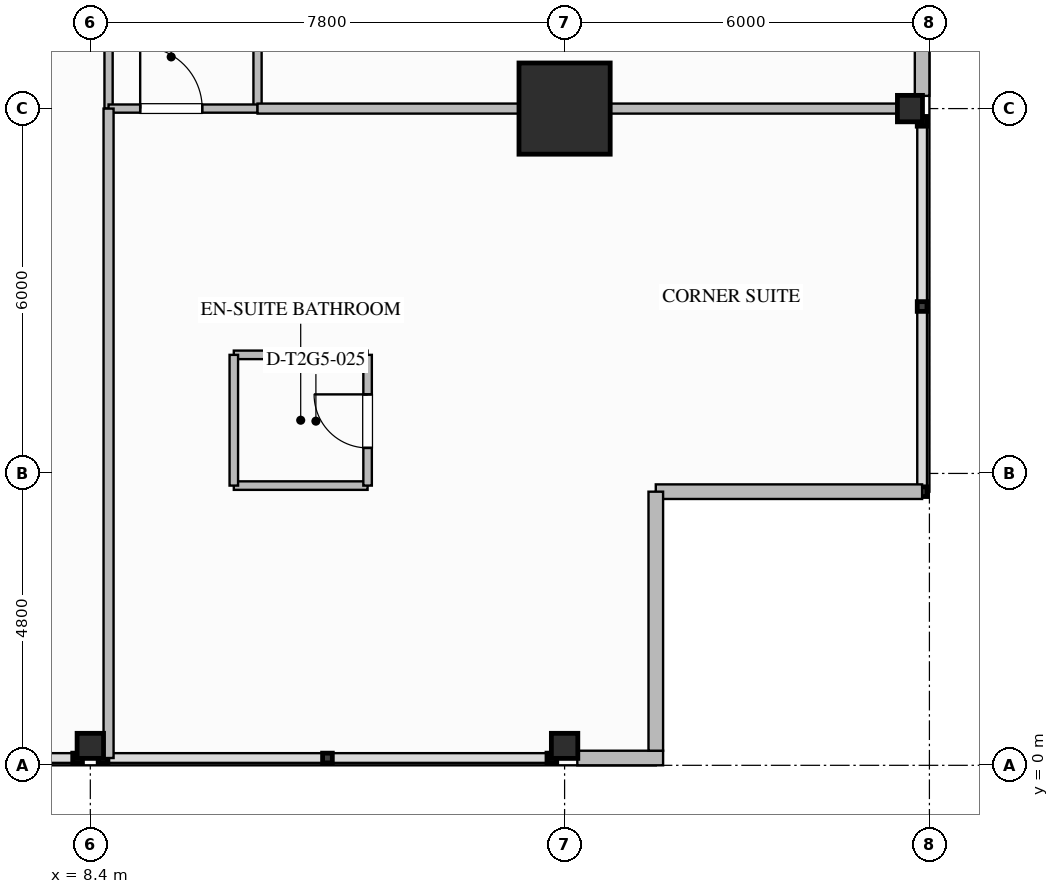
"""IFC4 building model, lengths in metres.
Left out: names, types, materials, properties, quantities, classifications, styles, units other than length and angle.
Written with IfcOpenShell. Run it as: python <this file> out.ifc"""

import sys

from ifc_helpers import new_model, si_unit, direction, frame, frame_2d, origin, origin_2d, place, context, subcontext, project, spatial, rectangle, i_section, extrude, element, fill, save


model = new_model("IFC4")
c1 = context("Model", 3, precision=1e-05, world=origin(), true_north=direction((0.0, 1.0)))
c2 = subcontext(c1, "Body", "Model", "MODEL_VIEW")
j1 = project(units=[si_unit("LENGTHUNIT", "METRE"), si_unit("PLANEANGLEUNIT", "RADIAN")], contexts=[c1])
p1 = place(None, origin())
s1 = spatial("IfcSite", under=j1, at=p1, CompositionType="ELEMENT")
p2 = place(p1, origin())
s2 = spatial("IfcBuilding", under=s1, at=p2, CompositionType="ELEMENT")
p3 = place(p2, frame((0.0, 0.0, 133.8)))
s3 = spatial("IfcBuildingStorey", under=s2, at=p3, CompositionType="ELEMENT", Elevation=133.8)
p4 = place(p3, frame((16.2, 10.8, 0.0), z_axis=(0.0, 0.0, 1.0), x_axis=(1.0, 0.0, 0.0)))
e1 = element("IfcColumn", 1, at=p4, inside=s3, PredefinedType="COLUMN", context=c2, shape_type="SweptSolid", body=[
    extrude(rectangle(XDim=1.5, YDim=1.5, at=origin_2d()), origin(), (0.0, 0.0, 1.0), 3.5),
])
for number, where, z_axis, x_axis in (
    (2, (21.88, 10.8, 0.0), (0.0, 0.0, 1.0), (1.0, 0.0, 0.0)),
    (3, (8.4, 0.32, 0.0), (0.0, 0.0, 1.0), (0.0, 1.0, 0.0)),
    (4, (16.2, 0.32, 0.0), (0.0, 0.0, 1.0), (0.0, 1.0, 0.0)),
):
    element("IfcColumn", number, at=place(p3, frame(where, z_axis=z_axis, x_axis=x_axis)), inside=s3, PredefinedType="COLUMN", context=c2, shape_type="SweptSolid", body=[
        extrude(i_section(OverallWidth=0.412, OverallDepth=0.435, WebThickness=0.036, FlangeThickness=0.057, FilletRadius=0.028, at=origin_2d()), origin(), (0.0, 0.0, 1.0), 3.497),
    ])
p5 = place(p3, frame((22.08, 18.391, 0.0), z_axis=(0.0, 0.0, 1.0), x_axis=(0.0, -1.0, 0.0)))
e5 = element("IfcWall", 5, at=p5, inside=s3, PredefinedType="STANDARD", context=c2, shape_type="SweptSolid", body=[
    extrude(rectangle(XDim=7.381, YDim=0.24, at=frame_2d((3.69, 0.0))), origin(), (0.0, 0.0, 1.0), 2.629),
])
p6 = place(p5, frame((1.791, 0.0, 0.0)))
e6 = element("IfcOpeningElement", 6, at=p6, cuts=e5, PredefinedType="OPENING", context=c2, shape_type="SweptSolid", body=[
    extrude(rectangle(XDim=1.0, YDim=2.2, at=frame_2d((0.5, 1.1))), frame((0.0, 0.13, 0.0), z_axis=(0.0, -1.0, 0.0), x_axis=(1.0, 0.0, 0.0)), (0.0, 0.0, 1.0), 0.26),
])
p7 = place(p5, frame((4.011, 0.0, 0.75)))
e7 = element("IfcOpeningElement", 7, at=p7, cuts=e5, PredefinedType="OPENING", context=c2, shape_type="SweptSolid", body=[
    extrude(rectangle(XDim=1.8, YDim=1.779, at=frame_2d((0.9, 0.889))), frame((0.0, 0.13, 0.0), z_axis=(0.0, -1.0, 0.0), x_axis=(1.0, 0.0, 0.0)), (0.0, 0.0, 1.0), 0.26),
])
p8 = place(p3, frame((17.82, 0.12, 0.0), z_axis=(0.0, 0.0, 1.0), x_axis=(-1.0, 0.0, 0.0)))
e8 = element("IfcWall", 8, at=p8, inside=s3, PredefinedType="STANDARD", context=c2, shape_type="SweptSolid", body=[
    extrude(rectangle(XDim=1.411, YDim=0.24, at=frame_2d((0.705, 0.0))), origin(), (0.0, 0.0, 1.0), 3.24),
])
p9 = place(p3, frame((22.08, 4.5, 0.0), z_axis=(0.0, 0.0, 1.0), x_axis=(-1.0, 0.0, 0.0)))
e9 = element("IfcWall", 9, at=p9, inside=s3, PredefinedType="STANDARD", context=c2, shape_type="SweptSolid", body=[
    extrude(rectangle(XDim=4.38, YDim=0.24, at=frame_2d((2.19, 0.0))), origin(), (0.0, 0.0, 1.0), 3.24),
])
p10 = place(p3, frame((17.7, 4.5, 0.0), z_axis=(0.0, 0.0, 1.0), x_axis=(0.0, -1.0, 0.0)))
e10 = element("IfcWall", 10, at=p10, inside=s3, PredefinedType="STANDARD", context=c2, shape_type="SweptSolid", body=[
    extrude(rectangle(XDim=4.26, YDim=0.24, at=frame_2d((2.13, 0.0))), origin(), (0.0, 0.0, 1.0), 3.24),
])
p11 = place(p3, frame((8.7, 10.8, 0.0), z_axis=(0.0, 0.0, 1.0), x_axis=(0.0, 1.0, 0.0)))
e11 = element("IfcWall", 11, at=p11, inside=s3, PredefinedType="PARTITIONING", context=c2, shape_type="SweptSolid", body=[
    extrude(rectangle(XDim=5.0, YDim=0.135, at=frame_2d((2.5, 0.0))), origin(), (0.0, 0.0, 1.0), 3.24),
])
p12 = place(p3, frame((11.15, 10.8, 0.0), z_axis=(0.0, 0.0, 1.0), x_axis=(0.0, 1.0, 0.0)))
e12 = element("IfcWall", 12, at=p12, inside=s3, PredefinedType="PARTITIONING", context=c2, shape_type="SweptSolid", body=[
    extrude(rectangle(XDim=32.4, YDim=0.135, at=frame_2d((16.2, 0.0))), origin(), (0.0, 0.0, 1.0), 3.24),
])
p13 = place(p12, frame((3.806, 0.0, 0.0)))
e13 = element("IfcOpeningElement", 13, at=p13, cuts=e12, PredefinedType="OPENING", context=c2, shape_type="SweptSolid", body=[
    extrude(rectangle(XDim=1.26, YDim=2.2, at=frame_2d((0.63, 1.1))), frame((0.0, 0.077, 0.0), z_axis=(0.0, -1.0, 0.0), x_axis=(1.0, 0.0, 0.0)), (0.0, 0.0, 1.0), 0.155),
])
p14 = place(p12, frame((15.57, 0.0, 0.0)))
e14 = element("IfcOpeningElement", 14, at=p14, cuts=e12, PredefinedType="OPENING", context=c2, shape_type="SweptSolid", body=[
    extrude(rectangle(XDim=1.26, YDim=2.2, at=frame_2d((0.63, 1.1))), frame((0.0, 0.077, 0.0), z_axis=(0.0, -1.0, 0.0), x_axis=(1.0, 0.0, 0.0)), (0.0, 0.0, 1.0), 0.155),
])
p15 = place(p12, frame((24.904, 0.0, 0.0)))
e15 = element("IfcOpeningElement", 15, at=p15, cuts=e12, PredefinedType="OPENING", context=c2, shape_type="SweptSolid", body=[
    extrude(rectangle(XDim=1.26, YDim=2.2, at=frame_2d((0.63, 1.1))), frame((0.0, 0.077, 0.0), z_axis=(0.0, -1.0, 0.0), x_axis=(1.0, 0.0, 0.0)), (0.0, 0.0, 1.0), 0.155),
])
p16 = place(p3, frame((8.7, 10.8, 0.0), z_axis=(0.0, 0.0, 1.0), x_axis=(1.0, 0.0, 0.0)))
e16 = element("IfcWall", 16, at=p16, inside=s3, PredefinedType="PARTITIONING", context=c2, shape_type="SweptSolid", body=[
    extrude(rectangle(XDim=2.45, YDim=0.135, at=frame_2d((1.225, 0.0))), origin(), (0.0, 0.0, 1.0), 2.53),
])
p17 = place(p16, frame((0.52, 0.0, 0.0)))
e17 = element("IfcOpeningElement", 17, at=p17, cuts=e16, PredefinedType="OPENING", context=c2, shape_type="SweptSolid", body=[
    extrude(rectangle(XDim=1.02, YDim=2.15, at=frame_2d((0.51, 1.075))), frame((0.0, 0.077, 0.0), z_axis=(0.0, -1.0, 0.0), x_axis=(1.0, 0.0, 0.0)), (0.0, 0.0, 1.0), 0.155),
])
p18 = place(p3, frame((8.7, 0.12, 0.0), z_axis=(0.0, 0.0, 1.0), x_axis=(0.0, 1.0, 0.0)))
e18 = element("IfcWall", 18, at=p18, inside=s3, PredefinedType="PARTITIONING", context=c2, shape_type="SweptSolid", body=[
    extrude(rectangle(XDim=10.68, YDim=0.165, at=frame_2d((5.34, 0.0))), origin(), (0.0, 0.0, 1.0), 2.53),
])
p19 = place(p3, frame((11.15, 10.8, 0.0), z_axis=(0.0, 0.0, 1.0), x_axis=(1.0, 0.0, 0.0)))
e19 = element("IfcWall", 19, at=p19, inside=s3, PredefinedType="PARTITIONING", context=c2, shape_type="SweptSolid", body=[
    extrude(rectangle(XDim=10.93, YDim=0.165, at=frame_2d((5.465, 0.0))), origin(), (0.0, 0.0, 1.0), 2.53),
])
for number, where, z_axis, x_axis in (
    (20, (10.76, 4.6, 0.0), (0.0, 0.0, 1.0), (1.0, 0.0, 0.0)),
    (21, (10.76, 6.75, 0.0), (0.0, 0.0, 1.0), (1.0, 0.0, 0.0)),
):
    element("IfcWall", number, at=place(p3, frame(where, z_axis=z_axis, x_axis=x_axis)), inside=s3, PredefinedType="PLUMBINGWALL", context=c2, shape_type="SweptSolid", body=[
        extrude(rectangle(XDim=2.2, YDim=0.14, at=frame_2d((1.1, 0.0))), origin(), (0.0, 0.0, 1.0), 3.24),
    ])
p20 = place(p3, frame((10.76, 4.6, 0.0), z_axis=(0.0, 0.0, 1.0), x_axis=(0.0, 1.0, 0.0)))
e22 = element("IfcWall", 22, at=p20, inside=s3, PredefinedType="PLUMBINGWALL", context=c2, shape_type="SweptSolid", body=[
    extrude(rectangle(XDim=2.15, YDim=0.14, at=frame_2d((1.075, 0.0))), origin(), (0.0, 0.0, 1.0), 3.24),
])
p21 = place(p3, frame((12.96, 4.6, 0.0), z_axis=(0.0, 0.0, 1.0), x_axis=(0.0, 1.0, 0.0)))
e23 = element("IfcWall", 23, at=p21, inside=s3, PredefinedType="PLUMBINGWALL", context=c2, shape_type="SweptSolid", body=[
    extrude(rectangle(XDim=2.15, YDim=0.14, at=frame_2d((1.075, 0.0))), origin(), (0.0, 0.0, 1.0), 3.24),
])
p22 = place(p21, frame((0.62, 0.0, 0.0)))
e24 = element("IfcOpeningElement", 24, at=p22, cuts=e23, PredefinedType="OPENING", context=c2, shape_type="SweptSolid", body=[
    extrude(rectangle(XDim=0.88, YDim=2.1, at=frame_2d((0.44, 1.05))), frame((0.0, 0.08, 0.0), z_axis=(0.0, -1.0, 0.0), x_axis=(1.0, 0.0, 0.0)), (0.0, 0.0, 1.0), 0.16),
])
p23 = place(p22, origin())
e25 = element("IfcDoor", 25, at=p23, inside=s3, OperationType="SINGLE_SWING_RIGHT", PredefinedType="DOOR", context=c2, shape_type="SweptSolid", body=[
    extrude(rectangle(XDim=0.88, YDim=2.1, at=frame_2d((0.44, 1.05))), frame((0.0, 0.025, 0.0), z_axis=(0.0, -1.0, 0.0), x_axis=(1.0, 0.0, 0.0)), (0.0, 0.0, 1.0), 0.05),
])
fill(e24, e25)
p24 = place(p17, origin())
e26 = element("IfcDoor", 26, at=p24, inside=s3, OperationType="SINGLE_SWING_LEFT", PredefinedType="DOOR", context=c2, shape_type="SweptSolid", body=[
    extrude(rectangle(XDim=1.02, YDim=2.15, at=frame_2d((0.51, 1.075))), frame((0.0, 0.025, 0.0), z_axis=(0.0, -1.0, 0.0), x_axis=(1.0, 0.0, 0.0)), (0.0, 0.0, 1.0), 0.05),
])
fill(e17, e26)
save(model, sys.argv[1])
